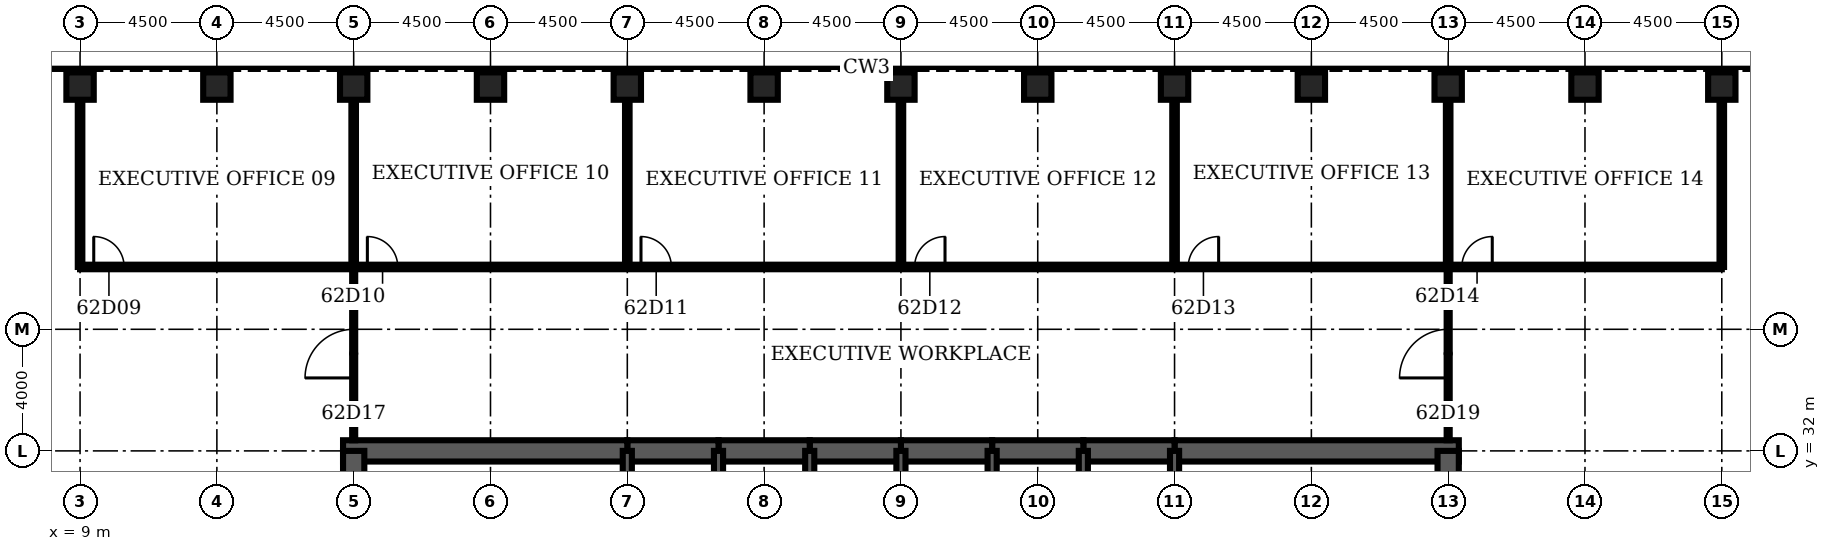
"""IFC4 building model, lengths in metres.
Left out: names, types, materials, properties, quantities, classifications, styles, units other than length and angle.
Written with IfcOpenShell. Run it as: python <this file> out.ifc"""

import sys

from ifc_helpers import new_model, si_unit, direction, frame, frame_2d, origin, origin_2d, place, context, subcontext, project, spatial, rectangle, hollow_rectangle, extrude, element, fill, save


model = new_model("IFC4")
c1 = context("Model", 3, precision=1e-05, world=origin(), true_north=direction((0.0, 1.0)))
c2 = subcontext(c1, "Body", "Model", "MODEL_VIEW")
j1 = project(units=[si_unit("LENGTHUNIT", "METRE"), si_unit("PLANEANGLEUNIT", "RADIAN")], contexts=[c1])
p1 = place(None, origin())
s1 = spatial("IfcSite", under=j1, at=p1, CompositionType="ELEMENT")
p2 = place(p1, origin())
s2 = spatial("IfcBuilding", under=s1, at=p2, CompositionType="ELEMENT")
p3 = place(p2, frame((0.0, 0.0, 275.3)))
s3 = spatial("IfcBuildingStorey", under=s2, at=p3, CompositionType="ELEMENT", Elevation=275.3)
for number, where, z_axis, x_axis in (
    (1, (63.0, 44.0, 0.0), (0.0, 0.0, 1.0), (0.0, 1.0, 0.0)),
    (2, (58.5, 44.0, 0.0), (0.0, 0.0, 1.0), (0.0, 1.0, 0.0)),
    (3, (54.0, 44.0, 0.0), (0.0, 0.0, 1.0), (0.0, 1.0, 0.0)),
    (4, (49.5, 44.0, 0.0), (0.0, 0.0, 1.0), (0.0, 1.0, 0.0)),
    (5, (45.0, 44.0, 0.0), (0.0, 0.0, 1.0), (0.0, 1.0, 0.0)),
    (6, (40.5, 44.0, 0.0), (0.0, 0.0, 1.0), (0.0, 1.0, 0.0)),
    (7, (36.0, 44.0, 0.0), (0.0, 0.0, 1.0), (0.0, 1.0, 0.0)),
    (8, (31.5, 44.0, 0.0), (0.0, 0.0, 1.0), (0.0, 1.0, 0.0)),
    (9, (27.0, 44.0, 0.0), (0.0, 0.0, 1.0), (0.0, 1.0, 0.0)),
    (10, (22.5, 44.0, 0.0), (0.0, 0.0, 1.0), (0.0, 1.0, 0.0)),
    (11, (18.0, 44.0, 0.0), (0.0, 0.0, 1.0), (0.0, 1.0, 0.0)),
    (12, (13.5, 44.0, 0.0), (0.0, 0.0, 1.0), (0.0, 1.0, 0.0)),
    (13, (9.0, 44.0, 0.0), (0.0, 0.0, 1.0), (0.0, 1.0, 0.0)),
):
    element("IfcColumn", number, at=place(p3, frame(where, z_axis=z_axis, x_axis=x_axis)), inside=s3, PredefinedType="COLUMN", context=c2, shape_type="SweptSolid", body=[
        extrude(hollow_rectangle(XDim=0.9, YDim=0.9, WallThickness=0.07, at=origin_2d()), origin(), (0.0, 0.0, 1.0), 4.2),
    ])
p4 = place(p3, frame((54.35, 32.0, 0.0), z_axis=(0.0, 0.0, 1.0), x_axis=(-1.0, 0.0, 0.0)))
e14 = element("IfcWall", 14, at=p4, inside=s3, PredefinedType="SHEAR", context=c2, shape_type="SweptSolid", body=[
    extrude(rectangle(XDim=9.35, YDim=0.7, at=frame_2d((4.675, 0.0))), origin(), (0.0, 0.0, 1.0), 4.2),
])
for number, where, z_axis, x_axis in (
    (15, (45.0, 32.0, 0.0), (0.0, 0.0, 1.0), (-1.0, 0.0, 0.0)),
    (16, (42.0, 32.0, 0.0), (0.0, 0.0, 1.0), (-1.0, 0.0, 0.0)),
    (17, (39.0, 32.0, 0.0), (0.0, 0.0, 1.0), (-1.0, 0.0, 0.0)),
    (18, (36.0, 32.0, 0.0), (0.0, 0.0, 1.0), (-1.0, 0.0, 0.0)),
    (19, (33.0, 32.0, 0.0), (0.0, 0.0, 1.0), (-1.0, 0.0, 0.0)),
    (20, (30.0, 32.0, 0.0), (0.0, 0.0, 1.0), (-1.0, 0.0, 0.0)),
):
    element("IfcWall", number, at=place(p3, frame(where, z_axis=z_axis, x_axis=x_axis)), inside=s3, PredefinedType="SHEAR", context=c2, shape_type="SweptSolid", body=[
        extrude(rectangle(XDim=3.0, YDim=0.7, at=frame_2d((1.5, 0.0))), origin(), (0.0, 0.0, 1.0), 4.2),
    ])
p5 = place(p3, frame((27.0, 32.0, 0.0), z_axis=(0.0, 0.0, 1.0), x_axis=(-1.0, 0.0, 0.0)))
e21 = element("IfcWall", 21, at=p5, inside=s3, PredefinedType="SHEAR", context=c2, shape_type="SweptSolid", body=[
    extrude(rectangle(XDim=9.35, YDim=0.7, at=frame_2d((4.675, 0.0))), origin(), (0.0, 0.0, 1.0), 4.2),
])
for number, where, z_axis, x_axis in (
    (22, (18.0, 32.0, 0.0), (0.0, 0.0, 1.0), (0.0, -1.0, 0.0)),
    (23, (54.0, 28.8, 0.0), (0.0, 0.0, 1.0), (0.0, 1.0, 0.0)),
):
    element("IfcWall", number, at=place(p3, frame(where, z_axis=z_axis, x_axis=x_axis)), inside=s3, PredefinedType="SHEAR", context=c2, shape_type="SweptSolid", body=[
        extrude(rectangle(XDim=3.2, YDim=0.7, at=frame_2d((1.6, 0.0))), origin(), (0.0, 0.0, 1.0), 4.2),
    ])
for number, where, z_axis, x_axis in (
    (24, (27.0, 28.8, 0.0), (0.0, 0.0, 1.0), (0.0, 1.0, 0.0)),
    (25, (30.0, 28.8, 0.0), (0.0, 0.0, 1.0), (0.0, 1.0, 0.0)),
    (26, (33.0, 28.8, 0.0), (0.0, 0.0, 1.0), (0.0, 1.0, 0.0)),
    (27, (36.0, 28.8, 0.0), (0.0, 0.0, 1.0), (0.0, 1.0, 0.0)),
    (28, (39.0, 28.8, 0.0), (0.0, 0.0, 1.0), (0.0, 1.0, 0.0)),
    (29, (42.0, 28.8, 0.0), (0.0, 0.0, 1.0), (0.0, 1.0, 0.0)),
    (30, (45.0, 28.8, 0.0), (0.0, 0.0, 1.0), (0.0, 1.0, 0.0)),
):
    element("IfcWall", number, at=place(p3, frame(where, z_axis=z_axis, x_axis=x_axis)), inside=s3, PredefinedType="SOLIDWALL", context=c2, shape_type="SweptSolid", body=[
        extrude(rectangle(XDim=3.2, YDim=0.3, at=frame_2d((1.6, 0.0))), origin(), (0.0, 0.0, 1.0), 4.2),
    ])
p6 = place(p3, frame((9.0, 38.05, 0.0), z_axis=(0.0, 0.0, 1.0), x_axis=(1.0, 0.0, 0.0)))
e31 = element("IfcWall", 31, at=p6, inside=s3, PredefinedType="PARTITIONING", context=c2, shape_type="SweptSolid", body=[
    extrude(rectangle(XDim=54.0, YDim=0.15, at=frame_2d((27.0, 0.0))), origin(), (0.0, 0.0, 1.0), 3.0),
])
p7 = place(p6, frame((0.45, 0.0, 0.0)))
e32 = element("IfcOpeningElement", 32, at=p7, cuts=e31, PredefinedType="OPENING", context=c2, shape_type="SweptSolid", body=[
    extrude(rectangle(XDim=1.0, YDim=2.1, at=frame_2d((0.5, 1.05))), frame((0.0, 0.085, 0.0), z_axis=(0.0, -1.0, 0.0), x_axis=(1.0, 0.0, 0.0)), (0.0, 0.0, 1.0), 0.17),
])
p8 = place(p6, frame((9.45, 0.0, 0.0)))
e33 = element("IfcOpeningElement", 33, at=p8, cuts=e31, PredefinedType="OPENING", context=c2, shape_type="SweptSolid", body=[
    extrude(rectangle(XDim=1.0, YDim=2.1, at=frame_2d((0.5, 1.05))), frame((0.0, 0.085, 0.0), z_axis=(0.0, -1.0, 0.0), x_axis=(1.0, 0.0, 0.0)), (0.0, 0.0, 1.0), 0.17),
])
p9 = place(p6, frame((18.45, 0.0, 0.0)))
e34 = element("IfcOpeningElement", 34, at=p9, cuts=e31, PredefinedType="OPENING", context=c2, shape_type="SweptSolid", body=[
    extrude(rectangle(XDim=1.0, YDim=2.1, at=frame_2d((0.5, 1.05))), frame((0.0, 0.085, 0.0), z_axis=(0.0, -1.0, 0.0), x_axis=(1.0, 0.0, 0.0)), (0.0, 0.0, 1.0), 0.17),
])
p10 = place(p6, frame((27.45, 0.0, 0.0)))
e35 = element("IfcOpeningElement", 35, at=p10, cuts=e31, PredefinedType="OPENING", context=c2, shape_type="SweptSolid", body=[
    extrude(rectangle(XDim=1.0, YDim=2.1, at=frame_2d((0.5, 1.05))), frame((0.0, 0.085, 0.0), z_axis=(0.0, -1.0, 0.0), x_axis=(1.0, 0.0, 0.0)), (0.0, 0.0, 1.0), 0.17),
])
p11 = place(p6, frame((36.45, 0.0, 0.0)))
e36 = element("IfcOpeningElement", 36, at=p11, cuts=e31, PredefinedType="OPENING", context=c2, shape_type="SweptSolid", body=[
    extrude(rectangle(XDim=1.0, YDim=2.1, at=frame_2d((0.5, 1.05))), frame((0.0, 0.085, 0.0), z_axis=(0.0, -1.0, 0.0), x_axis=(1.0, 0.0, 0.0)), (0.0, 0.0, 1.0), 0.17),
])
p12 = place(p6, frame((45.45, 0.0, 0.0)))
e37 = element("IfcOpeningElement", 37, at=p12, cuts=e31, PredefinedType="OPENING", context=c2, shape_type="SweptSolid", body=[
    extrude(rectangle(XDim=1.0, YDim=2.1, at=frame_2d((0.5, 1.05))), frame((0.0, 0.085, 0.0), z_axis=(0.0, -1.0, 0.0), x_axis=(1.0, 0.0, 0.0)), (0.0, 0.0, 1.0), 0.17),
])
p13 = place(p3, frame((9.0, 38.05, 0.0), z_axis=(0.0, 0.0, 1.0), x_axis=(0.0, 1.0, 0.0)))
e38 = element("IfcWall", 38, at=p13, inside=s3, PredefinedType="PARTITIONING", context=c2, shape_type="SweptSolid", body=[
    extrude(rectangle(XDim=5.5, YDim=0.15, at=frame_2d((2.75, 0.0))), origin(), (0.0, 0.0, 1.0), 3.0),
])
p14 = place(p3, frame((18.0, 32.35, 0.0), z_axis=(0.0, 0.0, 1.0), x_axis=(0.0, 1.0, 0.0)))
e39 = element("IfcWall", 39, at=p14, inside=s3, PredefinedType="PARTITIONING", context=c2, shape_type="SweptSolid", body=[
    extrude(rectangle(XDim=5.7, YDim=0.1, at=frame_2d((2.85, 0.0))), origin(), (0.0, 0.0, 1.0), 3.0),
])
p15 = place(p14, frame((2.05, 0.0, 0.0)))
e40 = element("IfcOpeningElement", 40, at=p15, cuts=e39, PredefinedType="OPENING", context=c2, shape_type="SweptSolid", body=[
    extrude(rectangle(XDim=1.6, YDim=2.1, at=frame_2d((0.8, 1.05))), frame((0.0, 0.06, 0.0), z_axis=(0.0, -1.0, 0.0), x_axis=(1.0, 0.0, 0.0)), (0.0, 0.0, 1.0), 0.12),
])
for number, where, z_axis, x_axis in (
    (41, (18.0, 38.05, 0.0), (0.0, 0.0, 1.0), (0.0, 1.0, 0.0)),
    (42, (27.0, 38.05, 0.0), (0.0, 0.0, 1.0), (0.0, 1.0, 0.0)),
    (43, (36.0, 38.05, 0.0), (0.0, 0.0, 1.0), (0.0, 1.0, 0.0)),
    (44, (45.0, 38.05, 0.0), (0.0, 0.0, 1.0), (0.0, 1.0, 0.0)),
):
    element("IfcWall", number, at=place(p3, frame(where, z_axis=z_axis, x_axis=x_axis)), inside=s3, PredefinedType="PARTITIONING", context=c2, shape_type="SweptSolid", body=[
        extrude(rectangle(XDim=5.5, YDim=0.15, at=frame_2d((2.75, 0.0))), origin(), (0.0, 0.0, 1.0), 3.0),
    ])
p16 = place(p3, frame((54.0, 32.35, 0.0), z_axis=(0.0, 0.0, 1.0), x_axis=(0.0, 1.0, 0.0)))
e45 = element("IfcWall", 45, at=p16, inside=s3, PredefinedType="PARTITIONING", context=c2, shape_type="SweptSolid", body=[
    extrude(rectangle(XDim=5.7, YDim=0.1, at=frame_2d((2.85, 0.0))), origin(), (0.0, 0.0, 1.0), 3.0),
])
p17 = place(p16, frame((2.05, 0.0, 0.0)))
e46 = element("IfcOpeningElement", 46, at=p17, cuts=e45, PredefinedType="OPENING", context=c2, shape_type="SweptSolid", body=[
    extrude(rectangle(XDim=1.6, YDim=2.1, at=frame_2d((0.8, 1.05))), frame((0.0, 0.06, 0.0), z_axis=(0.0, -1.0, 0.0), x_axis=(1.0, 0.0, 0.0)), (0.0, 0.0, 1.0), 0.12),
])
for number, where, z_axis, x_axis in (
    (47, (54.0, 38.05, 0.0), (0.0, 0.0, 1.0), (0.0, 1.0, 0.0)),
    (48, (63.0, 38.05, 0.0), (0.0, 0.0, 1.0), (0.0, 1.0, 0.0)),
):
    element("IfcWall", number, at=place(p3, frame(where, z_axis=z_axis, x_axis=x_axis)), inside=s3, PredefinedType="PARTITIONING", context=c2, shape_type="SweptSolid", body=[
        extrude(rectangle(XDim=5.5, YDim=0.15, at=frame_2d((2.75, 0.0))), origin(), (0.0, 0.0, 1.0), 3.0),
    ])
p18 = place(p7, origin())
e49 = element("IfcDoor", 49, at=p18, inside=s3, OperationType="SINGLE_SWING_LEFT", PredefinedType="DOOR", context=c2, shape_type="SweptSolid", body=[
    extrude(rectangle(XDim=1.0, YDim=2.1, at=frame_2d((0.5, 1.05))), frame((0.0, 0.025, 0.0), z_axis=(0.0, -1.0, 0.0), x_axis=(1.0, 0.0, 0.0)), (0.0, 0.0, 1.0), 0.05),
])
fill(e32, e49)
p19 = place(p8, origin())
e50 = element("IfcDoor", 50, at=p19, inside=s3, OperationType="SINGLE_SWING_LEFT", PredefinedType="DOOR", context=c2, shape_type="SweptSolid", body=[
    extrude(rectangle(XDim=1.0, YDim=2.1, at=frame_2d((0.5, 1.05))), frame((0.0, 0.025, 0.0), z_axis=(0.0, -1.0, 0.0), x_axis=(1.0, 0.0, 0.0)), (0.0, 0.0, 1.0), 0.05),
])
fill(e33, e50)
p20 = place(p9, origin())
e51 = element("IfcDoor", 51, at=p20, inside=s3, OperationType="SINGLE_SWING_LEFT", PredefinedType="DOOR", context=c2, shape_type="SweptSolid", body=[
    extrude(rectangle(XDim=1.0, YDim=2.1, at=frame_2d((0.5, 1.05))), frame((0.0, 0.025, 0.0), z_axis=(0.0, -1.0, 0.0), x_axis=(1.0, 0.0, 0.0)), (0.0, 0.0, 1.0), 0.05),
])
fill(e34, e51)
p21 = place(p10, origin())
e52 = element("IfcDoor", 52, at=p21, inside=s3, OperationType="SINGLE_SWING_RIGHT", PredefinedType="DOOR", context=c2, shape_type="SweptSolid", body=[
    extrude(rectangle(XDim=1.0, YDim=2.1, at=frame_2d((0.5, 1.05))), frame((0.0, 0.025, 0.0), z_axis=(0.0, -1.0, 0.0), x_axis=(1.0, 0.0, 0.0)), (0.0, 0.0, 1.0), 0.05),
])
fill(e35, e52)
p22 = place(p11, origin())
e53 = element("IfcDoor", 53, at=p22, inside=s3, OperationType="SINGLE_SWING_RIGHT", PredefinedType="DOOR", context=c2, shape_type="SweptSolid", body=[
    extrude(rectangle(XDim=1.0, YDim=2.1, at=frame_2d((0.5, 1.05))), frame((0.0, 0.025, 0.0), z_axis=(0.0, -1.0, 0.0), x_axis=(1.0, 0.0, 0.0)), (0.0, 0.0, 1.0), 0.05),
])
fill(e36, e53)
p23 = place(p12, origin())
e54 = element("IfcDoor", 54, at=p23, inside=s3, OperationType="SINGLE_SWING_RIGHT", PredefinedType="DOOR", context=c2, shape_type="SweptSolid", body=[
    extrude(rectangle(XDim=1.0, YDim=2.1, at=frame_2d((0.5, 1.05))), frame((0.0, 0.025, 0.0), z_axis=(0.0, -1.0, 0.0), x_axis=(1.0, 0.0, 0.0)), (0.0, 0.0, 1.0), 0.05),
])
fill(e37, e54)
p24 = place(p15, origin())
e55 = element("IfcDoor", 55, at=p24, inside=s3, OperationType="SINGLE_SWING_LEFT", PredefinedType="DOOR", context=c2, shape_type="SweptSolid", body=[
    extrude(rectangle(XDim=1.6, YDim=2.1, at=frame_2d((0.8, 1.05))), frame((0.0, 0.025, 0.0), z_axis=(0.0, -1.0, 0.0), x_axis=(1.0, 0.0, 0.0)), (0.0, 0.0, 1.0), 0.05),
])
fill(e40, e55)
p25 = place(p17, origin())
e56 = element("IfcDoor", 56, at=p25, inside=s3, OperationType="SINGLE_SWING_LEFT", PredefinedType="DOOR", context=c2, shape_type="SweptSolid", body=[
    extrude(rectangle(XDim=1.6, YDim=2.1, at=frame_2d((0.8, 1.05))), frame((0.0, 0.025, 0.0), z_axis=(0.0, -1.0, 0.0), x_axis=(1.0, 0.0, 0.0)), (0.0, 0.0, 1.0), 0.05),
])
fill(e46, e56)
save(model, sys.argv[1])
